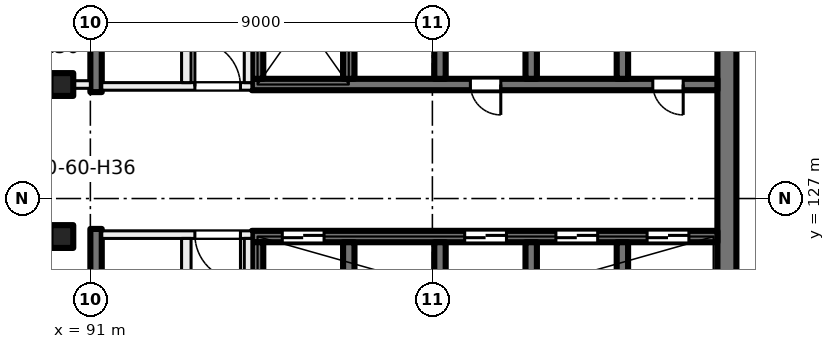
"""IFC4 building model, lengths in metres.
Left out: names, types, materials, properties, quantities, classifications, styles, units other than length and angle.
Written with IfcOpenShell. Run it as: python <this file> out.ifc"""

import sys

from ifc_helpers import new_model, si_unit, direction, frame, frame_2d, origin, origin_2d, place, context, subcontext, project, spatial, rectangle, extrude, element, fill, save


model = new_model("IFC4")
c1 = context("Model", 3, precision=1e-05, world=origin(), true_north=direction((0.0, 1.0)))
c2 = subcontext(c1, "Body", "Model", "MODEL_VIEW")
j1 = project(units=[si_unit("LENGTHUNIT", "METRE"), si_unit("PLANEANGLEUNIT", "RADIAN")], contexts=[c1])
p1 = place(None, origin())
s1 = spatial("IfcSite", under=j1, at=p1, CompositionType="ELEMENT")
p2 = place(p1, origin())
s2 = spatial("IfcBuilding", under=s1, at=p2, CompositionType="ELEMENT")
p3 = place(p2, frame((0.0, 0.0, 188.0)))
s3 = spatial("IfcBuildingStorey", under=s2, at=p3, CompositionType="ELEMENT", Elevation=188.0)
for number, where, z_axis, x_axis in (
    (1, (90.25, 130.0, 0.0), (0.0, 0.0, 1.0), (1.0, 0.0, 0.0)),
    (2, (90.25, 126.0, 0.0), (0.0, 0.0, 1.0), (1.0, 0.0, 0.0)),
):
    element("IfcColumn", number, at=place(p3, frame(where, z_axis=z_axis, x_axis=x_axis)), inside=s3, PredefinedType="COLUMN", context=c2, shape_type="SweptSolid", body=[
        extrude(rectangle(XDim=0.6, YDim=0.6, at=origin_2d()), origin(), (0.0, 0.0, 1.0), 4.0),
    ])
p4 = place(p3, frame((107.75, 135.2, 0.0), z_axis=(0.0, 0.0, 1.0), x_axis=(0.0, -1.0, 0.0)))
e3 = element("IfcWall", 3, at=p4, inside=s3, PredefinedType="SHEAR", context=c2, shape_type="SweptSolid", body=[
    extrude(rectangle(XDim=14.4, YDim=0.5, at=frame_2d((7.2, 0.0))), origin(), (0.0, 0.0, 1.0), 4.0),
])
p5 = place(p3, frame((107.5, 130.0, 0.0), z_axis=(0.0, 0.0, 1.0), x_axis=(-1.0, 0.0, 0.0)))
e4 = element("IfcWall", 4, at=p5, inside=s3, PredefinedType="SHEAR", context=c2, shape_type="SweptSolid", body=[
    extrude(rectangle(XDim=12.25, YDim=0.3, at=frame_2d((6.125, 0.0))), origin(), (0.0, 0.0, 1.0), 4.0),
])
p6 = place(p5, frame((0.9, 0.0, 0.0)))
e5 = element("IfcOpeningElement", 5, at=p6, cuts=e4, PredefinedType="OPENING", context=c2, shape_type="SweptSolid", body=[
    extrude(rectangle(XDim=0.8, YDim=2.1, at=frame_2d((0.4, 1.05))), frame((0.0, 0.16, 0.0), z_axis=(0.0, -1.0, 0.0), x_axis=(1.0, 0.0, 0.0)), (0.0, 0.0, 1.0), 0.32),
])
p7 = place(p5, frame((5.7, 0.0, 0.0)))
e6 = element("IfcOpeningElement", 6, at=p7, cuts=e4, PredefinedType="OPENING", context=c2, shape_type="SweptSolid", body=[
    extrude(rectangle(XDim=0.8, YDim=2.1, at=frame_2d((0.4, 1.05))), frame((0.0, 0.16, 0.0), z_axis=(0.0, -1.0, 0.0), x_axis=(1.0, 0.0, 0.0)), (0.0, 0.0, 1.0), 0.32),
])
for number, where, z_axis, x_axis in (
    (7, (105.0, 133.25, 0.0), (0.0, 0.0, 1.0), (0.0, -1.0, 0.0)),
    (8, (102.6, 133.25, 0.0), (0.0, 0.0, 1.0), (0.0, -1.0, 0.0)),
    (9, (100.2, 133.25, 0.0), (0.0, 0.0, 1.0), (0.0, -1.0, 0.0)),
    (10, (97.8, 133.25, 0.0), (0.0, 0.0, 1.0), (0.0, -1.0, 0.0)),
    (11, (95.4, 133.25, 0.0), (0.0, 0.0, 1.0), (0.0, -1.0, 0.0)),
):
    element("IfcWall", number, at=place(p3, frame(where, z_axis=z_axis, x_axis=x_axis)), inside=s3, PredefinedType="SHEAR", context=c2, shape_type="SweptSolid", body=[
        extrude(rectangle(XDim=3.1, YDim=0.3, at=frame_2d((1.55, 0.0))), origin(), (0.0, 0.0, 1.0), 4.0),
    ])
p8 = place(p3, frame((107.5, 126.0, 0.0), z_axis=(0.0, 0.0, 1.0), x_axis=(-1.0, 0.0, 0.0)))
e12 = element("IfcWall", 12, at=p8, inside=s3, PredefinedType="SHEAR", context=c2, shape_type="SweptSolid", body=[
    extrude(rectangle(XDim=12.25, YDim=0.3, at=frame_2d((6.125, 0.0))), origin(), (0.0, 0.0, 1.0), 4.0),
])
p9 = place(p8, frame((0.75, 0.0, 0.0)))
e13 = element("IfcOpeningElement", 13, at=p9, cuts=e12, PredefinedType="OPENING", context=c2, shape_type="SweptSolid", body=[
    extrude(rectangle(XDim=1.1, YDim=2.1, at=frame_2d((0.55, 1.05))), frame((0.0, 0.16, 0.0), z_axis=(0.0, -1.0, 0.0), x_axis=(1.0, 0.0, 0.0)), (0.0, 0.0, 1.0), 0.32),
])
p10 = place(p8, frame((3.15, 0.0, 0.0)))
e14 = element("IfcOpeningElement", 14, at=p10, cuts=e12, PredefinedType="OPENING", context=c2, shape_type="SweptSolid", body=[
    extrude(rectangle(XDim=1.1, YDim=2.1, at=frame_2d((0.55, 1.05))), frame((0.0, 0.16, 0.0), z_axis=(0.0, -1.0, 0.0), x_axis=(1.0, 0.0, 0.0)), (0.0, 0.0, 1.0), 0.32),
])
p11 = place(p8, frame((5.55, 0.0, 0.0)))
e15 = element("IfcOpeningElement", 15, at=p11, cuts=e12, PredefinedType="OPENING", context=c2, shape_type="SweptSolid", body=[
    extrude(rectangle(XDim=1.1, YDim=2.1, at=frame_2d((0.55, 1.05))), frame((0.0, 0.16, 0.0), z_axis=(0.0, -1.0, 0.0), x_axis=(1.0, 0.0, 0.0)), (0.0, 0.0, 1.0), 0.32),
])
p12 = place(p8, frame((10.35, 0.0, 0.0)))
e16 = element("IfcOpeningElement", 16, at=p12, cuts=e12, PredefinedType="OPENING", context=c2, shape_type="SweptSolid", body=[
    extrude(rectangle(XDim=1.1, YDim=2.1, at=frame_2d((0.55, 1.05))), frame((0.0, 0.16, 0.0), z_axis=(0.0, -1.0, 0.0), x_axis=(1.0, 0.0, 0.0)), (0.0, 0.0, 1.0), 0.32),
])
for number, where, z_axis, x_axis in (
    (17, (105.0, 125.85, 0.0), (0.0, 0.0, 1.0), (0.0, -1.0, 0.0)),
    (18, (102.6, 125.85, 0.0), (0.0, 0.0, 1.0), (0.0, -1.0, 0.0)),
    (19, (100.2, 125.85, 0.0), (0.0, 0.0, 1.0), (0.0, -1.0, 0.0)),
    (20, (97.8, 125.85, 0.0), (0.0, 0.0, 1.0), (0.0, -1.0, 0.0)),
    (21, (95.4, 125.85, 0.0), (0.0, 0.0, 1.0), (0.0, -1.0, 0.0)),
):
    element("IfcWall", number, at=place(p3, frame(where, z_axis=z_axis, x_axis=x_axis)), inside=s3, PredefinedType="SHEAR", context=c2, shape_type="SweptSolid", body=[
        extrude(rectangle(XDim=3.1, YDim=0.3, at=frame_2d((1.55, 0.0))), origin(), (0.0, 0.0, 1.0), 4.0),
    ])
for number, where, z_axis, x_axis in (
    (22, (91.15, 138.5, 0.0), (0.0, 0.0, 1.0), (0.0, -1.0, 0.0)),
    (23, (91.15, 126.2, 0.0), (0.0, 0.0, 1.0), (0.0, -1.0, 0.0)),
):
    element("IfcWall", number, at=place(p3, frame(where, z_axis=z_axis, x_axis=x_axis)), inside=s3, PredefinedType="SHEAR", context=c2, shape_type="SweptSolid", body=[
        extrude(rectangle(XDim=8.7, YDim=0.3, at=frame_2d((4.35, 0.0))), origin(), (0.0, 0.0, 1.0), 4.0),
    ])
p13 = place(p3, frame((95.25, 126.05, 0.0), z_axis=(0.0, 0.0, 1.0), x_axis=(-1.0, 0.0, 0.0)))
e24 = element("IfcWall", 24, at=p13, inside=s3, PredefinedType="PARTITIONING", context=c2, shape_type="SweptSolid", body=[
    extrude(rectangle(XDim=3.95, YDim=0.2, at=frame_2d((1.975, 0.0))), origin(), (0.0, 0.0, 1.0), 3.625),
])
p14 = place(p13, frame((0.3, 0.0, 0.0)))
e25 = element("IfcOpeningElement", 25, at=p14, cuts=e24, PredefinedType="OPENING", context=c2, shape_type="SweptSolid", body=[
    extrude(rectangle(XDim=1.2, YDim=2.1, at=frame_2d((0.6, 1.05))), frame((0.0, 0.11, 0.0), z_axis=(0.0, -1.0, 0.0), x_axis=(1.0, 0.0, 0.0)), (0.0, 0.0, 1.0), 0.22),
])
p15 = place(p3, frame((95.15, 117.5, 0.0), z_axis=(0.0, 0.0, 1.0), x_axis=(0.0, 1.0, 0.0)))
e26 = element("IfcWall", 26, at=p15, inside=s3, PredefinedType="PARTITIONING", context=c2, shape_type="SweptSolid", body=[
    extrude(rectangle(XDim=8.45, YDim=0.2, at=frame_2d((4.225, 0.0))), origin(), (0.0, 0.0, 1.0), 3.625),
])
p16 = place(p15, frame((1.725, 0.0, 0.0)))
e27 = element("IfcOpeningElement", 27, at=p16, cuts=e26, PredefinedType="OPENING", context=c2, shape_type="SweptSolid", body=[
    extrude(rectangle(XDim=1.5, YDim=2.1, at=frame_2d((0.75, 1.05))), frame((0.0, 0.11, 0.0), z_axis=(0.0, -1.0, 0.0), x_axis=(1.0, 0.0, 0.0)), (0.0, 0.0, 1.0), 0.22),
])
p17 = place(p3, frame((93.525, 117.5, 0.0), z_axis=(0.0, 0.0, 1.0), x_axis=(0.0, 1.0, 0.0)))
e28 = element("IfcWall", 28, at=p17, inside=s3, PredefinedType="PARTITIONING", context=c2, shape_type="SweptSolid", body=[
    extrude(rectangle(XDim=8.45, YDim=0.25, at=frame_2d((4.225, 0.0))), origin(), (0.0, 0.0, 1.0), 3.625),
])
p18 = place(p17, frame((5.96, 0.0, 0.0)))
e29 = element("IfcOpeningElement", 29, at=p18, cuts=e28, PredefinedType="OPENING", context=c2, shape_type="SweptSolid", body=[
    extrude(rectangle(XDim=0.8, YDim=2.1, at=frame_2d((0.4, 1.05))), frame((0.0, 0.135, 0.0), z_axis=(0.0, -1.0, 0.0), x_axis=(1.0, 0.0, 0.0)), (0.0, 0.0, 1.0), 0.27),
])
p19 = place(p17, frame((1.685, 0.0, 0.0)))
e30 = element("IfcOpeningElement", 30, at=p19, cuts=e28, PredefinedType="OPENING", context=c2, shape_type="SweptSolid", body=[
    extrude(rectangle(XDim=0.8, YDim=2.1, at=frame_2d((0.4, 1.05))), frame((0.0, 0.135, 0.0), z_axis=(0.0, -1.0, 0.0), x_axis=(1.0, 0.0, 0.0)), (0.0, 0.0, 1.0), 0.27),
])
p20 = place(p3, frame((91.3, 129.95, 0.0), z_axis=(0.0, 0.0, 1.0), x_axis=(1.0, 0.0, 0.0)))
e31 = element("IfcWall", 31, at=p20, inside=s3, PredefinedType="PARTITIONING", context=c2, shape_type="SweptSolid", body=[
    extrude(rectangle(XDim=3.95, YDim=0.2, at=frame_2d((1.975, 0.0))), origin(), (0.0, 0.0, 1.0), 3.625),
])
p21 = place(p20, frame((2.45, 0.0, 0.0)))
e32 = element("IfcOpeningElement", 32, at=p21, cuts=e31, PredefinedType="OPENING", context=c2, shape_type="SweptSolid", body=[
    extrude(rectangle(XDim=1.2, YDim=2.1, at=frame_2d((0.6, 1.05))), frame((0.0, 0.11, 0.0), z_axis=(0.0, -1.0, 0.0), x_axis=(1.0, 0.0, 0.0)), (0.0, 0.0, 1.0), 0.22),
])
p22 = place(p3, frame((95.15, 130.05, 0.0), z_axis=(0.0, 0.0, 1.0), x_axis=(0.0, 1.0, 0.0)))
e33 = element("IfcWall", 33, at=p22, inside=s3, PredefinedType="PARTITIONING", context=c2, shape_type="SweptSolid", body=[
    extrude(rectangle(XDim=8.45, YDim=0.2, at=frame_2d((4.225, 0.0))), origin(), (0.0, 0.0, 1.0), 3.625),
])
p23 = place(p22, frame((5.225, 0.0, 0.0)))
e34 = element("IfcOpeningElement", 34, at=p23, cuts=e33, PredefinedType="OPENING", context=c2, shape_type="SweptSolid", body=[
    extrude(rectangle(XDim=1.5, YDim=2.1, at=frame_2d((0.75, 1.05))), frame((0.0, 0.11, 0.0), z_axis=(0.0, -1.0, 0.0), x_axis=(1.0, 0.0, 0.0)), (0.0, 0.0, 1.0), 0.22),
])
p24 = place(p3, frame((93.525, 130.05, 0.0), z_axis=(0.0, 0.0, 1.0), x_axis=(0.0, 1.0, 0.0)))
e35 = element("IfcWall", 35, at=p24, inside=s3, PredefinedType="PARTITIONING", context=c2, shape_type="SweptSolid", body=[
    extrude(rectangle(XDim=8.45, YDim=0.25, at=frame_2d((4.225, 0.0))), origin(), (0.0, 0.0, 1.0), 3.625),
])
p25 = place(p24, frame((2.39, 0.0, 0.0)))
e36 = element("IfcOpeningElement", 36, at=p25, cuts=e35, PredefinedType="OPENING", context=c2, shape_type="SweptSolid", body=[
    extrude(rectangle(XDim=0.8, YDim=2.1, at=frame_2d((0.4, 1.05))), frame((0.0, 0.135, 0.0), z_axis=(0.0, -1.0, 0.0), x_axis=(1.0, 0.0, 0.0)), (0.0, 0.0, 1.0), 0.27),
])
p26 = place(p24, frame((6.665, 0.0, 0.0)))
e37 = element("IfcOpeningElement", 37, at=p26, cuts=e35, PredefinedType="OPENING", context=c2, shape_type="SweptSolid", body=[
    extrude(rectangle(XDim=0.8, YDim=2.1, at=frame_2d((0.4, 1.05))), frame((0.0, 0.135, 0.0), z_axis=(0.0, -1.0, 0.0), x_axis=(1.0, 0.0, 0.0)), (0.0, 0.0, 1.0), 0.27),
])
p27 = place(p3, frame((87.7, 130.0, 0.0), z_axis=(0.0, 0.0, 1.0), x_axis=(1.0, 0.0, 0.0)))
e38 = element("IfcWall", 38, at=p27, inside=s3, PredefinedType="PARTITIONING", context=c2, shape_type="SweptSolid", body=[
    extrude(rectangle(XDim=3.3, YDim=0.2, at=frame_2d((1.65, 0.0))), origin(), (0.0, 0.0, 1.0), 3.625),
])
p28 = place(p9, origin())
e39 = element("IfcDoor", 39, at=p28, inside=s3, OperationType="DOUBLE_DOOR_SLIDING", PredefinedType="DOOR", context=c2, shape_type="SweptSolid", body=[
    extrude(rectangle(XDim=1.1, YDim=2.1, at=frame_2d((0.55, 1.05))), frame((0.0, 0.025, 0.0), z_axis=(0.0, -1.0, 0.0), x_axis=(1.0, 0.0, 0.0)), (0.0, 0.0, 1.0), 0.05),
])
fill(e13, e39)
p29 = place(p10, origin())
e40 = element("IfcDoor", 40, at=p29, inside=s3, OperationType="DOUBLE_DOOR_SLIDING", PredefinedType="DOOR", context=c2, shape_type="SweptSolid", body=[
    extrude(rectangle(XDim=1.1, YDim=2.1, at=frame_2d((0.55, 1.05))), frame((0.0, 0.025, 0.0), z_axis=(0.0, -1.0, 0.0), x_axis=(1.0, 0.0, 0.0)), (0.0, 0.0, 1.0), 0.05),
])
fill(e14, e40)
p30 = place(p11, origin())
e41 = element("IfcDoor", 41, at=p30, inside=s3, OperationType="DOUBLE_DOOR_SLIDING", PredefinedType="DOOR", context=c2, shape_type="SweptSolid", body=[
    extrude(rectangle(XDim=1.1, YDim=2.1, at=frame_2d((0.55, 1.05))), frame((0.0, 0.025, 0.0), z_axis=(0.0, -1.0, 0.0), x_axis=(1.0, 0.0, 0.0)), (0.0, 0.0, 1.0), 0.05),
])
fill(e15, e41)
p31 = place(p12, origin())
e42 = element("IfcDoor", 42, at=p31, inside=s3, OperationType="DOUBLE_DOOR_SLIDING", PredefinedType="DOOR", context=c2, shape_type="SweptSolid", body=[
    extrude(rectangle(XDim=1.1, YDim=2.1, at=frame_2d((0.55, 1.05))), frame((0.0, 0.025, 0.0), z_axis=(0.0, -1.0, 0.0), x_axis=(1.0, 0.0, 0.0)), (0.0, 0.0, 1.0), 0.05),
])
fill(e16, e42)
p32 = place(p6, origin())
e43 = element("IfcDoor", 43, at=p32, inside=s3, OperationType="SINGLE_SWING_LEFT", PredefinedType="DOOR", context=c2, shape_type="SweptSolid", body=[
    extrude(rectangle(XDim=0.8, YDim=2.1, at=frame_2d((0.4, 1.05))), frame((0.0, 0.025, 0.0), z_axis=(0.0, -1.0, 0.0), x_axis=(1.0, 0.0, 0.0)), (0.0, 0.0, 1.0), 0.05),
])
fill(e5, e43)
p33 = place(p7, origin())
e44 = element("IfcDoor", 44, at=p33, inside=s3, OperationType="SINGLE_SWING_RIGHT", PredefinedType="DOOR", context=c2, shape_type="SweptSolid", body=[
    extrude(rectangle(XDim=0.8, YDim=2.1, at=frame_2d((0.4, 1.05))), frame((0.0, 0.025, 0.0), z_axis=(0.0, -1.0, 0.0), x_axis=(1.0, 0.0, 0.0)), (0.0, 0.0, 1.0), 0.05),
])
fill(e6, e44)
p34 = place(p14, origin())
e45 = element("IfcDoor", 45, at=p34, inside=s3, OperationType="DOUBLE_DOOR_SINGLE_SWING", PredefinedType="DOOR", context=c2, shape_type="SweptSolid", body=[
    extrude(rectangle(XDim=1.2, YDim=2.1, at=frame_2d((0.6, 1.05))), frame((0.0, 0.025, 0.0), z_axis=(0.0, -1.0, 0.0), x_axis=(1.0, 0.0, 0.0)), (0.0, 0.0, 1.0), 0.05),
])
fill(e25, e45)
p35 = place(p21, origin())
e46 = element("IfcDoor", 46, at=p35, inside=s3, OperationType="DOUBLE_DOOR_SINGLE_SWING", PredefinedType="DOOR", context=c2, shape_type="SweptSolid", body=[
    extrude(rectangle(XDim=1.2, YDim=2.1, at=frame_2d((0.6, 1.05))), frame((0.0, 0.025, 0.0), z_axis=(0.0, -1.0, 0.0), x_axis=(1.0, 0.0, 0.0)), (0.0, 0.0, 1.0), 0.05),
])
fill(e32, e46)
save(model, sys.argv[1])
